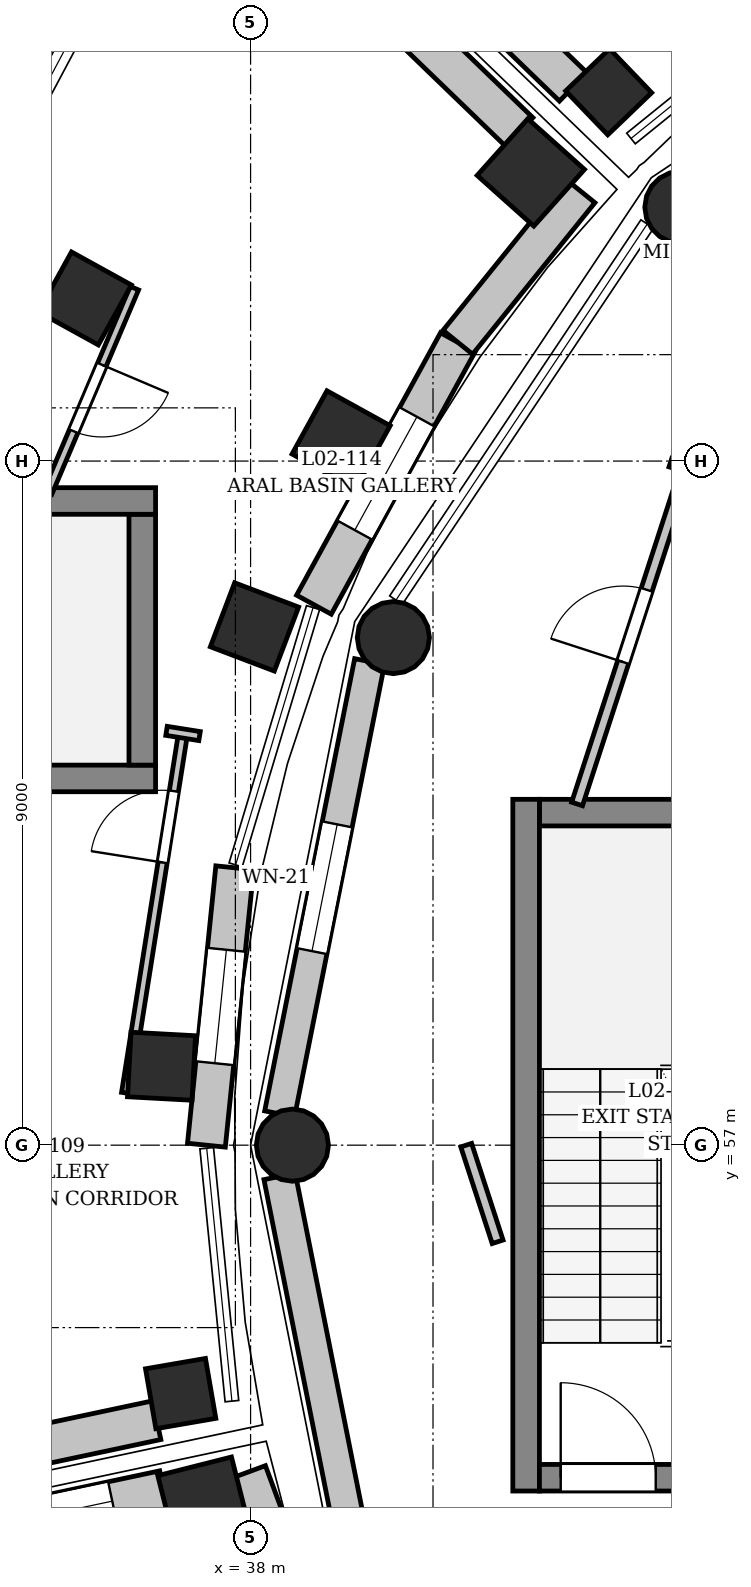
"""IFC4 building model, lengths in metres.
Left out: names, types, materials, properties, quantities, classifications, styles, units other than length and angle.
Written with IfcOpenShell. Run it as: python <this file> out.ifc"""

import sys

from ifc_helpers import new_model, si_unit, direction, frame, frame_2d, origin, origin_2d, place, context, subcontext, project, spatial, rectangle, circle, extrude, element, fill, save


model = new_model("IFC4")
c1 = context("Model", 3, precision=1e-05, world=origin(), true_north=direction((0.0, 1.0)))
c2 = subcontext(c1, "Body", "Model", "MODEL_VIEW")
j1 = project(units=[si_unit("LENGTHUNIT", "METRE"), si_unit("PLANEANGLEUNIT", "RADIAN")], contexts=[c1])
p1 = place(None, origin())
s1 = spatial("IfcSite", under=j1, at=p1, CompositionType="ELEMENT")
p2 = place(p1, origin())
s2 = spatial("IfcBuilding", under=s1, at=p2, CompositionType="ELEMENT")
p3 = place(p2, frame((0.0, 0.0, 5.4)))
s3 = spatial("IfcBuildingStorey", under=s2, at=p3, CompositionType="ELEMENT", Elevation=5.4)
for number, where, z_axis, x_axis in (
    (1, (43.661, 69.339, 0.0), (0.0, 0.0, 1.0), (-0.707, 0.707, 0.0)),
    (2, (39.878, 63.678, 0.0), (0.0, 0.0, 1.0), (-0.924, 0.383, 0.0)),
    (3, (38.55, 57.0, 0.0), (0.0, 0.0, 1.0), (-1.0, 0.0, 0.0)),
):
    element("IfcColumn", number, at=place(p3, frame(where, z_axis=z_axis, x_axis=x_axis)), inside=s3, PredefinedType="COLUMN", context=c2, shape_type="SweptSolid", body=[
        extrude(circle(Radius=0.475, at=origin_2d()), origin(), (0.0, 0.0, 1.0), 4.45),
    ])
p4 = place(p3, frame((37.387, 52.29, 0.0), z_axis=(0.0, 0.0, 1.0), x_axis=(-0.969445349895, -0.245307385879, 0.0)))
e4 = element("IfcColumn", 4, at=p4, inside=s3, PredefinedType="COLUMN", context=c2, shape_type="SweptSolid", body=[
    extrude(rectangle(XDim=1.0, YDim=1.0, at=origin_2d()), origin(), (0.0, 0.0, 1.0), 4.58),
])
p5 = place(p3, frame((41.687, 69.797, 0.0), z_axis=(0.0, 0.0, 1.0), x_axis=(-0.745475999683, 0.666532470249, 0.0)))
e5 = element("IfcColumn", 5, at=p5, inside=s3, PredefinedType="COLUMN", context=c2, shape_type="SweptSolid", body=[
    extrude(rectangle(XDim=1.0, YDim=1.0, at=origin_2d()), origin(), (0.0, 0.0, 1.0), 4.52),
])
p6 = place(p3, frame((39.191, 66.279, 0.0), z_axis=(0.0, 0.0, 1.0), x_axis=(-0.875464527, 0.483282383255, 0.0)))
e6 = element("IfcColumn", 6, at=p6, inside=s3, PredefinedType="COLUMN", context=c2, shape_type="SweptSolid", body=[
    extrude(rectangle(XDim=0.95, YDim=0.95, at=origin_2d()), origin(), (0.0, 0.0, 1.0), 4.52),
])
for number, where, z_axis, x_axis in (
    (7, (35.821, 68.14, 0.0), (0.0, 0.0, 1.0), (-0.875, 0.483, 0.0)),
    (8, (38.051, 63.818, 0.0), (0.0, 0.0, 1.0), (-0.935, 0.355, 0.0)),
):
    element("IfcColumn", number, at=place(p3, frame(where, z_axis=z_axis, x_axis=x_axis)), inside=s3, PredefinedType="COLUMN", context=c2, shape_type="SweptSolid", body=[
        extrude(rectangle(XDim=0.9, YDim=0.9, at=origin_2d()), origin(), (0.0, 0.0, 1.0), 4.52),
    ])
p7 = place(p3, frame((36.828, 58.038, 0.0), z_axis=(0.0, 0.0, 1.0), x_axis=(-0.998536670326, 0.054078812985, 0.0)))
e9 = element("IfcColumn", 9, at=p7, inside=s3, PredefinedType="COLUMN", context=c2, shape_type="SweptSolid", body=[
    extrude(rectangle(XDim=0.85, YDim=0.85, at=origin_2d()), origin(), (0.0, 0.0, 1.0), 4.52),
])
p8 = place(p3, frame((37.08, 53.732, 0.0), z_axis=(0.0, 0.0, 1.0), x_axis=(-0.985407898483, -0.170209499166, 0.0)))
e10 = element("IfcColumn", 10, at=p8, inside=s3, PredefinedType="COLUMN", context=c2, shape_type="SweptSolid", body=[
    extrude(rectangle(XDim=0.8, YDim=0.8, at=origin_2d()), origin(), (0.0, 0.0, 1.0), 4.52),
])
p9 = place(p3, frame((42.711, 70.858, 0.0), z_axis=(0.0, 0.0, 1.0), x_axis=(-0.69214317387, 0.721760228098, 0.0)))
e11 = element("IfcColumn", 11, at=p9, inside=s3, PredefinedType="COLUMN", context=c2, shape_type="SweptSolid", body=[
    extrude(rectangle(XDim=0.8, YDim=0.8, at=origin_2d()), origin(), (0.0, 0.0, 1.0), 4.5),
])
p10 = place(p3, frame((38.382, 57.412, 0.0), z_axis=(0.0, 0.0, 1.0), x_axis=(0.195109895888, 0.980781386715, 0.0)))
e12 = element("IfcWall", 12, at=p10, inside=s3, PredefinedType="SOLIDWALL", context=c2, shape_type="SweptSolid", body=[
    extrude(rectangle(XDim=6.066, YDim=0.4, at=frame_2d((3.033, 0.0))), origin(), (0.0, 0.0, 1.0), 3.94),
])
p11 = place(p10, frame((2.183, 0.0, 0.9)))
e13 = element("IfcOpeningElement", 13, at=p11, cuts=e12, PredefinedType="OPENING", context=c2, shape_type="SweptSolid", body=[
    extrude(rectangle(XDim=1.7, YDim=1.55, at=frame_2d((0.85, 0.775))), frame((0.0, 0.21, 0.0), z_axis=(0.0, -1.0, 0.0), x_axis=(1.0, 0.0, 0.0)), (0.0, 0.0, 1.0), 0.42),
])
p12 = place(p3, frame((39.565, 50.638, 0.0), z_axis=(0.0, 0.0, 1.0), x_axis=(-0.195109895888, 0.980781386715, 0.0)))
e14 = element("IfcWall", 14, at=p12, inside=s3, PredefinedType="SOLIDWALL", context=c2, shape_type="SweptSolid", body=[
    extrude(rectangle(XDim=6.066, YDim=0.42, at=frame_2d((3.033, 0.0))), origin(), (0.0, 0.0, 1.0), 3.94),
])
p13 = place(p3, frame((37.951, 52.693, 0.0), z_axis=(0.0, 0.0, 1.0), x_axis=(0.346456169042, -0.938066161277, 0.0)))
e15 = element("IfcWall", 15, at=p13, inside=s3, PredefinedType="SOLIDWALL", context=c2, shape_type="SweptSolid", body=[
    extrude(rectangle(XDim=4.55, YDim=0.52, at=frame_2d((2.275, 0.0))), origin(), (0.0, 0.0, 1.0), 5.16),
])
p14 = place(p13, frame((1.425, 0.0, 0.9)))
e16 = element("IfcOpeningElement", 16, at=p14, cuts=e15, PredefinedType="OPENING", context=c2, shape_type="SweptSolid", body=[
    extrude(rectangle(XDim=1.7, YDim=1.55, at=frame_2d((0.85, 0.775))), frame((0.0, 0.27, 0.0), z_axis=(0.0, -1.0, 0.0), x_axis=(1.0, 0.0, 0.0)), (0.0, 0.0, 1.0), 0.54),
])
p15 = place(p3, frame((33.986, 51.85, 0.0), z_axis=(0.0, 0.0, 1.0), x_axis=(0.9781332809, 0.207979048934, 0.0)))
e17 = element("IfcWall", 17, at=p15, inside=s3, PredefinedType="SOLIDWALL", context=c2, shape_type="SweptSolid", body=[
    extrude(rectangle(XDim=2.937, YDim=0.52, at=frame_2d((1.469, 0.0))), origin(), (0.0, 0.0, 1.0), 4.693),
])
p16 = place(p15, frame((0.694, 0.0, 0.9)))
e18 = element("IfcOpeningElement", 18, at=p16, cuts=e17, PredefinedType="OPENING", context=c2, shape_type="SweptSolid", body=[
    extrude(rectangle(XDim=1.55, YDim=1.85, at=frame_2d((0.775, 0.925))), frame((0.0, 0.27, 0.0), z_axis=(0.0, -1.0, 0.0), x_axis=(1.0, 0.0, 0.0)), (0.0, 0.0, 1.0), 0.54),
])
p17 = place(p3, frame((40.726, 67.563, 0.0), z_axis=(0.0, 0.0, 1.0), x_axis=(-0.480801851499, -0.876829276196, 0.0)))
e19 = element("IfcWall", 19, at=p17, inside=s3, PredefinedType="SOLIDWALL", context=c2, shape_type="SweptSolid", body=[
    extrude(rectangle(XDim=3.937, YDim=0.52, at=frame_2d((1.968, 0.0))), origin(), (0.0, 0.0, 1.0), 4.52),
])
p18 = place(p17, frame((1.118, 0.0, 0.9)))
e20 = element("IfcOpeningElement", 20, at=p18, cuts=e19, PredefinedType="OPENING", context=c2, shape_type="SweptSolid", body=[
    extrude(rectangle(XDim=1.7, YDim=1.55, at=frame_2d((0.85, 0.775))), frame((0.0, 0.27, 0.0), z_axis=(0.0, -1.0, 0.0), x_axis=(1.0, 0.0, 0.0)), (0.0, 0.0, 1.0), 0.54),
])
p19 = place(p3, frame((37.792, 60.649, 0.0), z_axis=(0.0, 0.0, 1.0), x_axis=(-0.101618529077, -0.994823438882, 0.0)))
e21 = element("IfcWall", 21, at=p19, inside=s3, PredefinedType="SOLIDWALL", context=c2, shape_type="SweptSolid", body=[
    extrude(rectangle(XDim=3.669, YDim=0.5, at=frame_2d((1.834, 0.0))), origin(), (0.0, 0.0, 1.0), 3.81),
])
p20 = place(p19, frame((1.084, 0.0, 0.9)))
e22 = element("IfcOpeningElement", 22, at=p20, cuts=e21, PredefinedType="OPENING", context=c2, shape_type="SweptSolid", body=[
    extrude(rectangle(XDim=1.5, YDim=2.1, at=frame_2d((0.75, 1.05))), frame((0.0, 0.26, 0.0), z_axis=(0.0, -1.0, 0.0), x_axis=(1.0, 0.0, 0.0)), (0.0, 0.0, 1.0), 0.52),
])
p21 = place(p3, frame((36.765, 53.382, 0.0), z_axis=(0.0, 0.0, 1.0), x_axis=(-0.978144003429, -0.207928614086, 0.0)))
e23 = element("IfcWall", 23, at=p21, inside=s3, PredefinedType="SOLIDWALL", context=c2, shape_type="SweptSolid", body=[
    extrude(rectangle(XDim=7.273, YDim=0.52, at=frame_2d((3.636, 0.0))), origin(), (0.0, 0.0, 1.0), 3.56),
])
p22 = place(p21, frame((3.516, 0.0, 0.9)))
e24 = element("IfcOpeningElement", 24, at=p22, cuts=e23, PredefinedType="OPENING", context=c2, shape_type="SweptSolid", body=[
    extrude(rectangle(XDim=1.8, YDim=2.1, at=frame_2d((0.9, 1.05))), frame((0.0, 0.27, 0.0), z_axis=(0.0, -1.0, 0.0), x_axis=(1.0, 0.0, 0.0)), (0.0, 0.0, 1.0), 0.54),
])
p23 = place(p3, frame((39.42, 72.371, 0.0), z_axis=(0.0, 0.0, 1.0), x_axis=(0.719382842016, -0.694613796734, 0.0)))
e25 = element("IfcWall", 25, at=p23, inside=s3, PredefinedType="SOLIDWALL", context=c2, shape_type="SweptSolid", body=[
    extrude(rectangle(XDim=2.937, YDim=0.52, at=frame_2d((1.469, 0.0))), origin(), (0.0, 0.0, 1.0), 3.41),
])
p24 = place(p3, frame((42.336, 69.556, 0.0), z_axis=(0.0, 0.0, 1.0), x_axis=(-0.6281751712, -0.77807194673, 0.0)))
e26 = element("IfcWall", 26, at=p24, inside=s3, PredefinedType="SOLIDWALL", context=c2, shape_type="SweptSolid", body=[
    extrude(rectangle(XDim=2.562, YDim=0.5, at=frame_2d((1.281, 0.0))), origin(), (0.0, 0.0, 1.0), 4.52),
])
p25 = place(p3, frame((42.244, 70.923, 0.0), z_axis=(0.0, 0.0, 1.0), x_axis=(-0.719345409555, 0.694652561898, 0.0)))
e27 = element("IfcWall", 27, at=p25, inside=s3, PredefinedType="SOLIDWALL", context=c2, shape_type="SweptSolid", body=[
    extrude(rectangle(XDim=11.934, YDim=0.52, at=frame_2d((5.967, 0.0))), origin(), (0.0, 0.0, 1.0), 3.54),
])
p26 = place(p25, frame((4.072, 0.0, 0.9)))
e28 = element("IfcOpeningElement", 28, at=p26, cuts=e27, PredefinedType="OPENING", context=c2, shape_type="SweptSolid", body=[
    extrude(rectangle(XDim=1.75, YDim=1.85, at=frame_2d((0.875, 0.925))), frame((0.0, 0.27, 0.0), z_axis=(0.0, -1.0, 0.0), x_axis=(1.0, 0.0, 0.0)), (0.0, 0.0, 1.0), 0.54),
])
p27 = place(p25, frame((6.892, 0.0, 0.9)))
e29 = element("IfcOpeningElement", 29, at=p27, cuts=e27, PredefinedType="OPENING", context=c2, shape_type="SweptSolid", body=[
    extrude(rectangle(XDim=1.75, YDim=1.85, at=frame_2d((0.875, 0.925))), frame((0.0, 0.27, 0.0), z_axis=(0.0, -1.0, 0.0), x_axis=(1.0, 0.0, 0.0)), (0.0, 0.0, 1.0), 0.54),
])
p28 = place(p3, frame((45.2, 61.375, 0.0), z_axis=(0.0, 0.0, 1.0), x_axis=(-1.0, 0.0, 0.0)))
e30 = element("IfcWall", 30, at=p28, inside=s3, PredefinedType="SHEAR", context=c2, shape_type="SweptSolid", body=[
    extrude(rectangle(XDim=3.4, YDim=0.35, at=frame_2d((1.7, 0.0))), origin(), (0.0, 0.0, 1.0), 4.45),
])
p29 = place(p3, frame((41.625, 61.55, 0.0), z_axis=(0.0, 0.0, 1.0), x_axis=(0.0, -1.0, 0.0)))
e31 = element("IfcWall", 31, at=p29, inside=s3, PredefinedType="SHEAR", context=c2, shape_type="SweptSolid", body=[
    extrude(rectangle(XDim=9.1, YDim=0.35, at=frame_2d((4.55, 0.0))), origin(), (0.0, 0.0, 1.0), 4.45),
])
p30 = place(p3, frame((41.8, 52.625, 0.0), z_axis=(0.0, 0.0, 1.0), x_axis=(1.0, 0.0, 0.0)))
e32 = element("IfcWall", 32, at=p30, inside=s3, PredefinedType="SHEAR", context=c2, shape_type="SweptSolid", body=[
    extrude(rectangle(XDim=3.4, YDim=0.35, at=frame_2d((1.7, 0.0))), origin(), (0.0, 0.0, 1.0), 4.45),
])
p31 = place(p30, frame((0.28, 0.0, 0.0)))
e33 = element("IfcOpeningElement", 33, at=p31, cuts=e32, PredefinedType="OPENING", context=c2, shape_type="SweptSolid", body=[
    extrude(rectangle(XDim=1.25, YDim=2.2, at=frame_2d((0.625, 1.1))), frame((0.0, 0.185, 0.0), z_axis=(0.0, -1.0, 0.0), x_axis=(1.0, 0.0, 0.0)), (0.0, 0.0, 1.0), 0.37),
])
p32 = place(p3, frame((27.65, 61.825, 0.0), z_axis=(0.0, 0.0, 1.0), x_axis=(1.0, 0.0, 0.0)))
e34 = element("IfcWall", 34, at=p32, inside=s3, PredefinedType="SHEAR", context=c2, shape_type="SweptSolid", body=[
    extrude(rectangle(XDim=9.1, YDim=0.35, at=frame_2d((4.55, 0.0))), origin(), (0.0, 0.0, 1.0), 4.52),
])
p33 = place(p3, frame((36.575, 62.0, 0.0), z_axis=(0.0, 0.0, 1.0), x_axis=(0.0, 1.0, 0.0)))
e35 = element("IfcWall", 35, at=p33, inside=s3, PredefinedType="SHEAR", context=c2, shape_type="SweptSolid", body=[
    extrude(rectangle(XDim=3.3, YDim=0.35, at=frame_2d((1.65, 0.0))), origin(), (0.0, 0.0, 1.0), 4.52),
])
p34 = place(p3, frame((36.75, 65.475, 0.0), z_axis=(0.0, 0.0, 1.0), x_axis=(-1.0, 0.0, 0.0)))
e36 = element("IfcWall", 36, at=p34, inside=s3, PredefinedType="SHEAR", context=c2, shape_type="SweptSolid", body=[
    extrude(rectangle(XDim=9.1, YDim=0.35, at=frame_2d((4.55, 0.0))), origin(), (0.0, 0.0, 1.0), 4.52),
])
p35 = place(p3, frame((42.295, 61.489, 0.0), z_axis=(0.0, 0.0, 1.0), x_axis=(0.309054026996, 0.95104448287, 0.0)))
e37 = element("IfcWall", 37, at=p35, inside=s3, PredefinedType="PARTITIONING", context=c2, shape_type="SweptSolid", body=[
    extrude(rectangle(XDim=4.651, YDim=0.15, at=frame_2d((2.326, 0.0))), origin(), (0.0, 0.0, 1.0), 4.45),
])
p36 = place(p35, frame((1.963, 0.0, 0.0)))
e38 = element("IfcOpeningElement", 38, at=p36, cuts=e37, PredefinedType="OPENING", context=c2, shape_type="SweptSolid", body=[
    extrude(rectangle(XDim=1.0, YDim=2.2, at=frame_2d((0.5, 1.1))), frame((0.0, 0.085, 0.0), z_axis=(0.0, -1.0, 0.0), x_axis=(1.0, 0.0, 0.0)), (0.0, 0.0, 1.0), 0.17),
])
p37 = place(p3, frame((41.25, 55.729, 0.0), z_axis=(0.0, 0.0, 1.0), x_axis=(-0.30898696848, 0.951066271776, 0.0)))
e39 = element("IfcWall", 39, at=p37, inside=s3, PredefinedType="PARTITIONING", context=c2, shape_type="SweptSolid", body=[
    extrude(rectangle(XDim=1.337, YDim=0.15, at=frame_2d((0.668, 0.0))), origin(), (0.0, 0.0, 1.0), 4.45),
])
p38 = place(p3, frame((43.942, 65.845, 0.0), z_axis=(0.0, 0.0, 1.0), x_axis=(-0.950989181438, 0.309224152984, 0.0)))
e40 = element("IfcWall", 40, at=p38, inside=s3, PredefinedType="PARTITIONING", context=c2, shape_type="SweptSolid", body=[
    extrude(rectangle(XDim=0.44, YDim=0.12, at=frame_2d((0.22, 0.0))), origin(), (0.0, 0.0, 1.0), 4.45),
])
p39 = place(p3, frame((36.362, 57.686, 0.0), z_axis=(0.0, 0.0, 1.0), x_axis=(0.156391852422, 0.987695088829, 0.0)))
e41 = element("IfcWall", 41, at=p39, inside=s3, PredefinedType="PARTITIONING", context=c2, shape_type="SweptSolid", body=[
    extrude(rectangle(XDim=4.789, YDim=0.12, at=frame_2d((2.395, 0.0))), origin(), (0.0, 0.0, 1.0), 3.61),
])
p40 = place(p39, frame((3.072, 0.0, 0.0)))
e42 = element("IfcOpeningElement", 42, at=p40, cuts=e41, PredefinedType="OPENING", context=c2, shape_type="SweptSolid", body=[
    extrude(rectangle(XDim=0.95, YDim=2.2, at=frame_2d((0.475, 1.1))), frame((0.0, 0.07, 0.0), z_axis=(0.0, -1.0, 0.0), x_axis=(1.0, 0.0, 0.0)), (0.0, 0.0, 1.0), 0.14),
])
p41 = place(p3, frame((36.471, 68.275, 0.0), z_axis=(0.0, 0.0, 1.0), x_axis=(-0.39080089657, -0.920475235539, 0.0)))
e43 = element("IfcWall", 43, at=p41, inside=s3, PredefinedType="PARTITIONING", context=c2, shape_type="SweptSolid", body=[
    extrude(rectangle(XDim=2.922, YDim=0.12, at=frame_2d((1.461, 0.0))), origin(), (0.0, 0.0, 1.0), 3.51),
])
p42 = place(p41, frame((1.095, 0.0, 0.0)))
e44 = element("IfcOpeningElement", 44, at=p42, cuts=e43, PredefinedType="OPENING", context=c2, shape_type="SweptSolid", body=[
    extrude(rectangle(XDim=0.95, YDim=2.2, at=frame_2d((0.475, 1.1))), frame((0.0, 0.07, 0.0), z_axis=(0.0, -1.0, 0.0), x_axis=(1.0, 0.0, 0.0)), (0.0, 0.0, 1.0), 0.14),
])
p43 = place(p3, frame((37.329, 62.382, 0.0), z_axis=(0.0, 0.0, 1.0), x_axis=(-0.987695424831, 0.156389730378, 0.0)))
e45 = element("IfcWall", 45, at=p43, inside=s3, PredefinedType="PARTITIONING", context=c2, shape_type="SweptSolid", body=[
    extrude(rectangle(XDim=0.44, YDim=0.12, at=frame_2d((0.22, 0.0))), origin(), (0.0, 0.0, 1.0), 4.52),
])
p44 = place(p11, origin())
e46 = element("IfcWindow", 46, at=p44, inside=s3, PartitioningType="DOUBLE_PANEL_VERTICAL", PredefinedType="WINDOW", context=c2, shape_type="SweptSolid", body=[
    extrude(rectangle(XDim=1.7, YDim=1.55, at=frame_2d((0.85, 0.775))), frame((0.0, 0.03, 0.0), z_axis=(0.0, -1.0, 0.0), x_axis=(1.0, 0.0, 0.0)), (0.0, 0.0, 1.0), 0.06),
])
fill(e13, e46)
p45 = place(p16, origin())
e47 = element("IfcWindow", 47, at=p45, inside=s3, PartitioningType="DOUBLE_PANEL_VERTICAL", PredefinedType="WINDOW", context=c2, shape_type="SweptSolid", body=[
    extrude(rectangle(XDim=1.55, YDim=1.85, at=frame_2d((0.775, 0.925))), frame((0.0, 0.03, 0.0), z_axis=(0.0, -1.0, 0.0), x_axis=(1.0, 0.0, 0.0)), (0.0, 0.0, 1.0), 0.06),
])
fill(e18, e47)
p46 = place(p18, origin())
e48 = element("IfcWindow", 48, at=p46, inside=s3, PartitioningType="DOUBLE_PANEL_VERTICAL", PredefinedType="WINDOW", context=c2, shape_type="SweptSolid", body=[
    extrude(rectangle(XDim=1.7, YDim=1.55, at=frame_2d((0.85, 0.775))), frame((0.0, 0.03, 0.0), z_axis=(0.0, -1.0, 0.0), x_axis=(1.0, 0.0, 0.0)), (0.0, 0.0, 1.0), 0.06),
])
fill(e20, e48)
p47 = place(p20, origin())
e49 = element("IfcWindow", 49, at=p47, inside=s3, PartitioningType="DOUBLE_PANEL_VERTICAL", PredefinedType="WINDOW", context=c2, shape_type="SweptSolid", body=[
    extrude(rectangle(XDim=1.5, YDim=2.1, at=frame_2d((0.75, 1.05))), frame((0.0, 0.03, 0.0), z_axis=(0.0, -1.0, 0.0), x_axis=(1.0, 0.0, 0.0)), (0.0, 0.0, 1.0), 0.06),
])
fill(e22, e49)
p48 = place(p31, origin())
e50 = element("IfcDoor", 50, at=p48, inside=s3, OperationType="SINGLE_SWING_LEFT", PredefinedType="DOOR", context=c2, shape_type="SweptSolid", body=[
    extrude(rectangle(XDim=1.25, YDim=2.2, at=frame_2d((0.625, 1.1))), frame((0.0, 0.025, 0.0), z_axis=(0.0, -1.0, 0.0), x_axis=(1.0, 0.0, 0.0)), (0.0, 0.0, 1.0), 0.05),
])
fill(e33, e50)
p49 = place(p36, origin())
e51 = element("IfcDoor", 51, at=p49, inside=s3, OperationType="SINGLE_SWING_LEFT", PredefinedType="DOOR", context=c2, shape_type="SweptSolid", body=[
    extrude(rectangle(XDim=1.0, YDim=2.2, at=frame_2d((0.5, 1.1))), frame((0.0, 0.025, 0.0), z_axis=(0.0, -1.0, 0.0), x_axis=(1.0, 0.0, 0.0)), (0.0, 0.0, 1.0), 0.05),
])
fill(e38, e51)
p50 = place(p40, origin())
e52 = element("IfcDoor", 52, at=p50, inside=s3, OperationType="SINGLE_SWING_LEFT", PredefinedType="DOOR", context=c2, shape_type="SweptSolid", body=[
    extrude(rectangle(XDim=0.95, YDim=2.2, at=frame_2d((0.475, 1.1))), frame((0.0, 0.025, 0.0), z_axis=(0.0, -1.0, 0.0), x_axis=(1.0, 0.0, 0.0)), (0.0, 0.0, 1.0), 0.05),
])
fill(e42, e52)
p51 = place(p42, origin())
e53 = element("IfcDoor", 53, at=p51, inside=s3, OperationType="SINGLE_SWING_LEFT", PredefinedType="DOOR", context=c2, shape_type="SweptSolid", body=[
    extrude(rectangle(XDim=0.95, YDim=2.2, at=frame_2d((0.475, 1.1))), frame((0.0, 0.025, 0.0), z_axis=(0.0, -1.0, 0.0), x_axis=(1.0, 0.0, 0.0)), (0.0, 0.0, 1.0), 0.05),
])
fill(e44, e53)
save(model, sys.argv[1])
